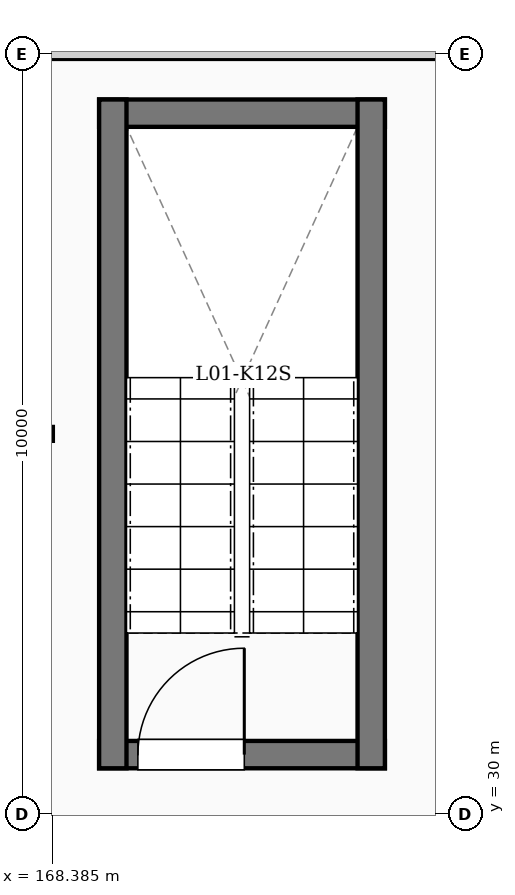
"""IFC4 building model, lengths in metres.
Left out: names, types, materials, properties, quantities, classifications, styles, units other than length and angle.
Written with IfcOpenShell. Run it as: python <this file> out.ifc"""

import sys

from ifc_helpers import new_model, si_unit, direction, frame, frame_2d, origin, place, context, subcontext, project, spatial, rectangle, extrude, element, fill, save


model = new_model("IFC4")
c1 = context("Model", 3, precision=1e-05, world=origin(), true_north=direction((0.0, 1.0)))
c2 = subcontext(c1, "Body", "Model", "MODEL_VIEW")
j1 = project(units=[si_unit("LENGTHUNIT", "METRE"), si_unit("PLANEANGLEUNIT", "RADIAN")], contexts=[c1])
p1 = place(None, origin())
s1 = spatial("IfcSite", under=j1, at=p1, CompositionType="ELEMENT")
p2 = place(p1, origin())
s2 = spatial("IfcBuilding", under=s1, at=p2, CompositionType="ELEMENT")
p3 = place(p2, frame((0.0, 0.0, 5.4)))
s3 = spatial("IfcBuildingStorey", under=s2, at=p3, CompositionType="ELEMENT", Elevation=5.4)
p4 = place(p3, frame((169.0, 30.78, 0.0), z_axis=(0.0, 0.0, 1.0), x_axis=(1.0, 0.0, 0.0)))
e1 = element("IfcWall", 1, at=p4, inside=s3, PredefinedType="SHEAR", context=c2, shape_type="SweptSolid", body=[
    extrude(rectangle(XDim=3.76, YDim=0.36, at=frame_2d((1.88, 0.0))), origin(), (0.0, 0.0, 1.0), 4.8),
])
p5 = place(p4, frame((0.51, 0.0, 0.0)))
e2 = element("IfcOpeningElement", 2, at=p5, cuts=e1, PredefinedType="OPENING", context=c2, shape_type="SweptSolid", body=[
    extrude(rectangle(XDim=1.4, YDim=2.35, at=frame_2d((0.7, 1.175))), frame((0.0, 0.19, 0.0), z_axis=(0.0, -1.0, 0.0), x_axis=(1.0, 0.0, 0.0)), (0.0, 0.0, 1.0), 0.38),
])
p6 = place(p3, frame((169.0, 39.22, 0.0), z_axis=(0.0, 0.0, 1.0), x_axis=(1.0, 0.0, 0.0)))
e3 = element("IfcWall", 3, at=p6, inside=s3, PredefinedType="SHEAR", context=c2, shape_type="SweptSolid", body=[
    extrude(rectangle(XDim=3.76, YDim=0.36, at=frame_2d((1.88, 0.0))), origin(), (0.0, 0.0, 1.0), 4.8),
])
for number, where, z_axis, x_axis in (
    (4, (169.18, 30.6, 0.0), (0.0, 0.0, 1.0), (0.0, 1.0, 0.0)),
    (5, (172.58, 30.6, 0.0), (0.0, 0.0, 1.0), (0.0, 1.0, 0.0)),
):
    element("IfcWall", number, at=place(p3, frame(where, z_axis=z_axis, x_axis=x_axis)), inside=s3, PredefinedType="SHEAR", context=c2, shape_type="SweptSolid", body=[
        extrude(rectangle(XDim=8.8, YDim=0.36, at=frame_2d((4.4, 0.0))), origin(), (0.0, 0.0, 1.0), 4.8),
    ])
p7 = place(p3, frame((156.6, 35.0, 0.0), z_axis=(0.0, 0.0, 1.0), x_axis=(1.0, 0.0, 0.0)))
e6 = element("IfcWall", 6, at=p7, inside=s3, PredefinedType="PARTITIONING", context=c2, shape_type="SweptSolid", body=[
    extrude(rectangle(XDim=11.8, YDim=0.2, at=frame_2d((5.9, 0.0))), origin(), (0.0, 0.0, 1.0), 4.46),
])
p8 = place(p7, frame((2.342, 0.0, 0.0)))
e7 = element("IfcOpeningElement", 7, at=p8, cuts=e6, PredefinedType="OPENING", context=c2, shape_type="SweptSolid", body=[
    extrude(rectangle(XDim=0.98, YDim=2.3, at=frame_2d((0.49, 1.15))), frame((0.0, 0.11, 0.0), z_axis=(0.0, -1.0, 0.0), x_axis=(1.0, 0.0, 0.0)), (0.0, 0.0, 1.0), 0.22),
])
p9 = place(p7, frame((8.428, 0.0, 0.0)))
e8 = element("IfcOpeningElement", 8, at=p9, cuts=e6, PredefinedType="OPENING", context=c2, shape_type="SweptSolid", body=[
    extrude(rectangle(XDim=1.08, YDim=2.35, at=frame_2d((0.54, 1.175))), frame((0.0, 0.11, 0.0), z_axis=(0.0, -1.0, 0.0), x_axis=(1.0, 0.0, 0.0)), (0.0, 0.0, 1.0), 0.22),
])
p10 = place(p3, frame((156.6, 40.0, 0.0), z_axis=(0.0, 0.0, 1.0), x_axis=(1.0, 0.0, 0.0)))
e9 = element("IfcWall", 9, at=p10, inside=s3, PredefinedType="PARTITIONING", context=c2, shape_type="SweptSolid", body=[
    extrude(rectangle(XDim=18.6, YDim=0.15, at=frame_2d((9.3, 0.0))), origin(), (0.0, 0.0, 1.0), 4.02),
])
p11 = place(p5, origin())
e10 = element("IfcDoor", 10, at=p11, inside=s3, OperationType="SINGLE_SWING_RIGHT", PredefinedType="DOOR", context=c2, shape_type="SweptSolid", body=[
    extrude(rectangle(XDim=1.4, YDim=2.35, at=frame_2d((0.7, 1.175))), frame((0.0, 0.025, 0.0), z_axis=(0.0, -1.0, 0.0), x_axis=(1.0, 0.0, 0.0)), (0.0, 0.0, 1.0), 0.05),
])
fill(e2, e10)
save(model, sys.argv[1])
